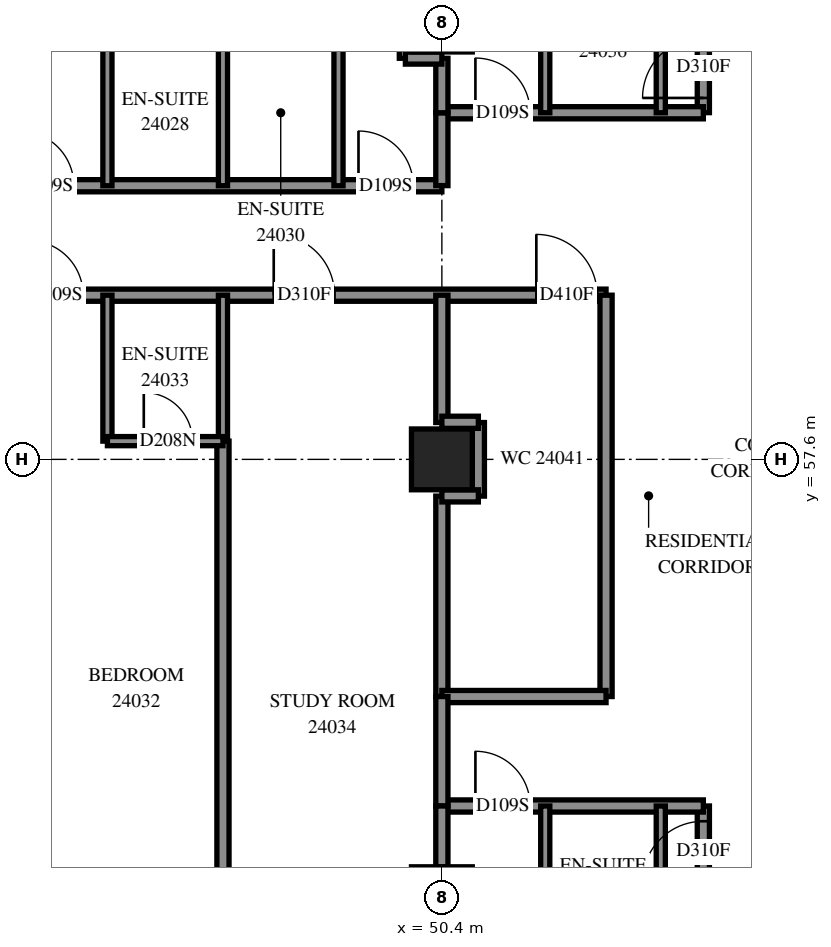
"""IFC4 building model, lengths in metres.
Left out: names, types, materials, properties, quantities, classifications, styles, units other than length and angle.
Written with IfcOpenShell. Run it as: python <this file> out.ifc"""

import sys

from ifc_helpers import new_model, si_unit, direction, frame, frame_2d, origin, origin_2d, place, context, subcontext, project, spatial, rectangle, extrude, element, fill, save


model = new_model("IFC4")
c1 = context("Model", 3, precision=1e-05, world=origin(), true_north=direction((0.0, 1.0)))
c2 = subcontext(c1, "Body", "Model", "MODEL_VIEW")
j1 = project(units=[si_unit("LENGTHUNIT", "METRE"), si_unit("PLANEANGLEUNIT", "RADIAN")], contexts=[c1])
p1 = place(None, origin())
s1 = spatial("IfcSite", under=j1, at=p1, CompositionType="ELEMENT")
p2 = place(p1, origin())
s2 = spatial("IfcBuilding", under=s1, at=p2, CompositionType="ELEMENT")
p3 = place(p2, frame((0.0, 0.0, 91.4)))
s3 = spatial("IfcBuildingStorey", under=s2, at=p3, CompositionType="ELEMENT", Elevation=91.4)
p4 = place(p3, frame((50.4, 57.6, 0.0), z_axis=(0.0, 0.0, 1.0), x_axis=(1.0, 0.0, 0.0)))
e1 = element("IfcColumn", 1, at=p4, inside=s3, PredefinedType="COLUMN", context=c2, shape_type="SweptSolid", body=[
    extrude(rectangle(XDim=1.0, YDim=1.0, at=origin_2d()), origin(), (0.0, 0.0, 1.0), 3.1),
])
p5 = place(p3, frame((28.802, 60.3, 0.0), z_axis=(0.0, 0.0, 1.0), x_axis=(1.0, 0.0, 0.0)))
e2 = element("IfcWall", 2, at=p5, inside=s3, PredefinedType="PARTITIONING", context=c2, shape_type="SweptSolid", body=[
    extrude(rectangle(XDim=24.298, YDim=0.2, at=frame_2d((12.149, 0.0))), origin(), (0.0, 0.0, 1.0), 3.1),
])
p6 = place(p5, frame((5.972, 0.0, 0.0)))
e3 = element("IfcOpeningElement", 3, at=p6, cuts=e2, PredefinedType="OPENING", context=c2, shape_type="SweptSolid", body=[
    extrude(rectangle(XDim=1.0, YDim=2.1, at=frame_2d((0.5, 1.05))), frame((0.0, 0.11, 0.0), z_axis=(0.0, -1.0, 0.0), x_axis=(1.0, 0.0, 0.0)), (0.0, 0.0, 1.0), 0.22),
])
p7 = place(p5, frame((11.323, 0.0, 0.0)))
e4 = element("IfcOpeningElement", 4, at=p7, cuts=e2, PredefinedType="OPENING", context=c2, shape_type="SweptSolid", body=[
    extrude(rectangle(XDim=1.0, YDim=2.1, at=frame_2d((0.5, 1.05))), frame((0.0, 0.11, 0.0), z_axis=(0.0, -1.0, 0.0), x_axis=(1.0, 0.0, 0.0)), (0.0, 0.0, 1.0), 0.22),
])
p8 = place(p5, frame((14.798, 0.0, 0.0)))
e5 = element("IfcOpeningElement", 5, at=p8, cuts=e2, PredefinedType="OPENING", context=c2, shape_type="SweptSolid", body=[
    extrude(rectangle(XDim=0.9, YDim=2.1, at=frame_2d((0.45, 1.05))), frame((0.0, 0.11, 0.0), z_axis=(0.0, -1.0, 0.0), x_axis=(1.0, 0.0, 0.0)), (0.0, 0.0, 1.0), 0.22),
])
p9 = place(p5, frame((18.833, 0.0, 0.0)))
e6 = element("IfcOpeningElement", 6, at=p9, cuts=e2, PredefinedType="OPENING", context=c2, shape_type="SweptSolid", body=[
    extrude(rectangle(XDim=1.0, YDim=2.1, at=frame_2d((0.5, 1.05))), frame((0.0, 0.11, 0.0), z_axis=(0.0, -1.0, 0.0), x_axis=(1.0, 0.0, 0.0)), (0.0, 0.0, 1.0), 0.22),
])
p10 = place(p5, frame((23.151, 0.0, 0.0)))
e7 = element("IfcOpeningElement", 7, at=p10, cuts=e2, PredefinedType="OPENING", context=c2, shape_type="SweptSolid", body=[
    extrude(rectangle(XDim=1.0, YDim=2.1, at=frame_2d((0.5, 1.05))), frame((0.0, 0.11, 0.0), z_axis=(0.0, -1.0, 0.0), x_axis=(1.0, 0.0, 0.0)), (0.0, 0.0, 1.0), 0.22),
])
p11 = place(p3, frame((33.3, 62.1, 0.0), z_axis=(0.0, 0.0, 1.0), x_axis=(1.0, 0.0, 0.0)))
e8 = element("IfcWall", 8, at=p11, inside=s3, PredefinedType="PARTITIONING", context=c2, shape_type="SweptSolid", body=[
    extrude(rectangle(XDim=17.1, YDim=0.2, at=frame_2d((8.55, 0.0))), origin(), (0.0, 0.0, 1.0), 3.1),
])
p12 = place(p11, frame((6.258, 0.0, 0.0)))
e9 = element("IfcOpeningElement", 9, at=p12, cuts=e8, PredefinedType="OPENING", context=c2, shape_type="SweptSolid", body=[
    extrude(rectangle(XDim=1.0, YDim=2.1, at=frame_2d((0.5, 1.05))), frame((0.0, 0.11, 0.0), z_axis=(0.0, -1.0, 0.0), x_axis=(1.0, 0.0, 0.0)), (0.0, 0.0, 1.0), 0.22),
])
p13 = place(p11, frame((10.148, 0.0, 0.0)))
e10 = element("IfcOpeningElement", 10, at=p13, cuts=e8, PredefinedType="OPENING", context=c2, shape_type="SweptSolid", body=[
    extrude(rectangle(XDim=0.9, YDim=2.1, at=frame_2d((0.45, 1.05))), frame((0.0, 0.11, 0.0), z_axis=(0.0, -1.0, 0.0), x_axis=(1.0, 0.0, 0.0)), (0.0, 0.0, 1.0), 0.22),
])
p14 = place(p11, frame((15.729, 0.0, 0.0)))
e11 = element("IfcOpeningElement", 11, at=p14, cuts=e8, PredefinedType="OPENING", context=c2, shape_type="SweptSolid", body=[
    extrude(rectangle(XDim=0.9, YDim=2.1, at=frame_2d((0.45, 1.05))), frame((0.0, 0.11, 0.0), z_axis=(0.0, -1.0, 0.0), x_axis=(1.0, 0.0, 0.0)), (0.0, 0.0, 1.0), 0.22),
])
p15 = place(p3, frame((46.8, 49.75, 0.0), z_axis=(0.0, 0.0, 1.0), x_axis=(0.0, 1.0, 0.0)))
e12 = element("IfcWall", 12, at=p15, inside=s3, PredefinedType="PARTITIONING", context=c2, shape_type="SweptSolid", body=[
    extrude(rectangle(XDim=8.15, YDim=0.2, at=frame_2d((4.075, 0.0))), origin(), (0.0, 0.0, 1.0), 3.1),
])
p16 = place(p3, frame((53.1, 53.7, 0.0), z_axis=(0.0, 0.0, 1.0), x_axis=(0.0, 1.0, 0.0)))
e13 = element("IfcWall", 13, at=p16, inside=s3, PredefinedType="PARTITIONING", context=c2, shape_type="SweptSolid", body=[
    extrude(rectangle(XDim=6.6, YDim=0.2, at=frame_2d((3.3, 0.0))), origin(), (0.0, 0.0, 1.0), 3.1),
])
p17 = place(p3, frame((54.7, 47.5, 0.0), z_axis=(0.0, 0.0, 1.0), x_axis=(0.0, 1.0, 0.0)))
e14 = element("IfcWall", 14, at=p17, inside=s3, PredefinedType="PARTITIONING", context=c2, shape_type="SweptSolid", body=[
    extrude(rectangle(XDim=4.4, YDim=0.2, at=frame_2d((2.2, 0.0))), origin(), (0.0, 0.0, 1.0), 3.1),
])
p18 = place(p17, frame((3.149, 0.0, 0.0)))
e15 = element("IfcOpeningElement", 15, at=p18, cuts=e14, PredefinedType="OPENING", context=c2, shape_type="SweptSolid", body=[
    extrude(rectangle(XDim=1.0, YDim=2.1, at=frame_2d((0.5, 1.05))), frame((0.0, 0.11, 0.0), z_axis=(0.0, -1.0, 0.0), x_axis=(1.0, 0.0, 0.0)), (0.0, 0.0, 1.0), 0.22),
])
p19 = place(p3, frame((54.7, 63.302, 0.0), z_axis=(0.0, 0.0, 1.0), x_axis=(0.0, 1.0, 0.0)))
e16 = element("IfcWall", 16, at=p19, inside=s3, PredefinedType="PARTITIONING", context=c2, shape_type="SweptSolid", body=[
    extrude(rectangle(XDim=4.398, YDim=0.2, at=frame_2d((2.199, 0.0))), origin(), (0.0, 0.0, 1.0), 3.1),
])
p20 = place(p19, frame((0.242, 0.0, 0.0)))
e17 = element("IfcOpeningElement", 17, at=p20, cuts=e16, PredefinedType="OPENING", context=c2, shape_type="SweptSolid", body=[
    extrude(rectangle(XDim=1.0, YDim=2.1, at=frame_2d((0.5, 1.05))), frame((0.0, 0.11, 0.0), z_axis=(0.0, -1.0, 0.0), x_axis=(1.0, 0.0, 0.0)), (0.0, 0.0, 1.0), 0.22),
])
p21 = place(p3, frame((50.4, 51.9, 0.0), z_axis=(0.0, 0.0, 1.0), x_axis=(1.0, 0.0, 0.0)))
e18 = element("IfcWall", 18, at=p21, inside=s3, PredefinedType="PARTITIONING", context=c2, shape_type="SweptSolid", body=[
    extrude(rectangle(XDim=4.3, YDim=0.2, at=frame_2d((2.15, 0.0))), origin(), (0.0, 0.0, 1.0), 3.1),
])
p22 = place(p21, frame((0.552, 0.0, 0.0)))
e19 = element("IfcOpeningElement", 19, at=p22, cuts=e18, PredefinedType="OPENING", context=c2, shape_type="SweptSolid", body=[
    extrude(rectangle(XDim=0.9, YDim=2.1, at=frame_2d((0.45, 1.05))), frame((0.0, 0.11, 0.0), z_axis=(0.0, -1.0, 0.0), x_axis=(1.0, 0.0, 0.0)), (0.0, 0.0, 1.0), 0.22),
])
p23 = place(p3, frame((50.4, 63.3, 0.0), z_axis=(0.0, 0.0, 1.0), x_axis=(1.0, 0.0, 0.0)))
e20 = element("IfcWall", 20, at=p23, inside=s3, PredefinedType="PARTITIONING", context=c2, shape_type="SweptSolid", body=[
    extrude(rectangle(XDim=4.3, YDim=0.2, at=frame_2d((2.15, 0.0))), origin(), (0.0, 0.0, 1.0), 3.1),
])
p24 = place(p23, frame((0.552, 0.0, 0.0)))
e21 = element("IfcOpeningElement", 21, at=p24, cuts=e20, PredefinedType="OPENING", context=c2, shape_type="SweptSolid", body=[
    extrude(rectangle(XDim=0.9, YDim=2.1, at=frame_2d((0.45, 1.05))), frame((0.0, 0.11, 0.0), z_axis=(0.0, -1.0, 0.0), x_axis=(1.0, 0.0, 0.0)), (0.0, 0.0, 1.0), 0.22),
])
p25 = place(p3, frame((50.4, 53.7, 0.0), z_axis=(0.0, 0.0, 1.0), x_axis=(0.0, 1.0, 0.0)))
e22 = element("IfcWall", 22, at=p25, inside=s3, PredefinedType="PARTITIONING", context=c2, shape_type="SweptSolid", body=[
    extrude(rectangle(XDim=3.296, YDim=0.2, at=frame_2d((1.648, 0.0))), origin(), (0.0, 0.0, 1.0), 3.1),
])
p26 = place(p3, frame((50.4, 53.7, 0.0), z_axis=(0.0, 0.0, 1.0), x_axis=(1.0, 0.0, 0.0)))
e23 = element("IfcWall", 23, at=p26, inside=s3, PredefinedType="PARTITIONING", context=c2, shape_type="SweptSolid", body=[
    extrude(rectangle(XDim=2.7, YDim=0.2, at=frame_2d((1.35, 0.0))), origin(), (0.0, 0.0, 1.0), 3.1),
])
for number, where, z_axis, x_axis in (
    (24, (52.1, 63.3, 0.0), (0.0, 0.0, 1.0), (0.0, 1.0, 0.0)),
    (25, (54.0, 63.3, 0.0), (0.0, 0.0, 1.0), (0.0, 1.0, 0.0)),
    (26, (44.9, 57.9, 0.0), (0.0, 0.0, 1.0), (0.0, 1.0, 0.0)),
    (27, (44.9, 62.1, 0.0), (0.0, 0.0, 1.0), (0.0, 1.0, 0.0)),
    (28, (46.8, 57.9, 0.0), (0.0, 0.0, 1.0), (0.0, 1.0, 0.0)),
    (29, (46.8, 62.1, 0.0), (0.0, 0.0, 1.0), (0.0, 1.0, 0.0)),
    (30, (48.7, 62.1, 0.0), (0.0, 0.0, 1.0), (0.0, 1.0, 0.0)),
    (31, (52.1, 49.5, 0.0), (0.0, 0.0, 1.0), (0.0, 1.0, 0.0)),
    (32, (54.0, 49.5, 0.0), (0.0, 0.0, 1.0), (0.0, 1.0, 0.0)),
):
    element("IfcWall", number, at=place(p3, frame(where, z_axis=z_axis, x_axis=x_axis)), inside=s3, PredefinedType="PARTITIONING", context=c2, shape_type="SweptSolid", body=[
        extrude(rectangle(XDim=2.4, YDim=0.15, at=frame_2d((1.2, 0.0))), origin(), (0.0, 0.0, 1.0), 3.1),
    ])
p27 = place(p3, frame((50.4, 58.206, 0.0), z_axis=(0.0, 0.0, 1.0), x_axis=(0.0, 1.0, 0.0)))
e33 = element("IfcWall", 33, at=p27, inside=s3, PredefinedType="PARTITIONING", context=c2, shape_type="SweptSolid", body=[
    extrude(rectangle(XDim=2.094, YDim=0.2, at=frame_2d((1.047, 0.0))), origin(), (0.0, 0.0, 1.0), 3.1),
])
p28 = place(p3, frame((44.9, 57.9, 0.0), z_axis=(0.0, 0.0, 1.0), x_axis=(1.0, 0.0, 0.0)))
e34 = element("IfcWall", 34, at=p28, inside=s3, PredefinedType="PARTITIONING", context=c2, shape_type="SweptSolid", body=[
    extrude(rectangle(XDim=1.9, YDim=0.15, at=frame_2d((0.95, 0.0))), origin(), (0.0, 0.0, 1.0), 3.1),
])
p29 = place(p28, frame((0.598, 0.0, 0.0)))
e35 = element("IfcOpeningElement", 35, at=p29, cuts=e34, PredefinedType="OPENING", context=c2, shape_type="SweptSolid", body=[
    extrude(rectangle(XDim=0.8, YDim=2.1, at=frame_2d((0.4, 1.05))), frame((0.0, 0.085, 0.0), z_axis=(0.0, -1.0, 0.0), x_axis=(1.0, 0.0, 0.0)), (0.0, 0.0, 1.0), 0.17),
])
p30 = place(p3, frame((50.4, 51.9, 0.0), z_axis=(0.0, 0.0, 1.0), x_axis=(0.0, 1.0, 0.0)))
e36 = element("IfcWall", 36, at=p30, inside=s3, PredefinedType="PARTITIONING", context=c2, shape_type="SweptSolid", body=[
    extrude(rectangle(XDim=1.8, YDim=0.2, at=frame_2d((0.9, 0.0))), origin(), (0.0, 0.0, 1.0), 3.1),
])
p31 = place(p3, frame((51.0, 56.996, 0.0), z_axis=(0.0, 0.0, 1.0), x_axis=(0.0, 1.0, 0.0)))
e37 = element("IfcWall", 37, at=p31, inside=s3, PredefinedType="PARTITIONING", context=c2, shape_type="SweptSolid", body=[
    extrude(rectangle(XDim=1.21, YDim=0.2, at=frame_2d((0.605, 0.0))), origin(), (0.0, 0.0, 1.0), 3.1),
])
p32 = place(p3, frame((49.8, 64.196, 0.0), z_axis=(0.0, 0.0, 1.0), x_axis=(0.0, 1.0, 0.0)))
e38 = element("IfcWall", 38, at=p32, inside=s3, PredefinedType="PARTITIONING", context=c2, shape_type="SweptSolid", body=[
    extrude(rectangle(XDim=1.208, YDim=0.2, at=frame_2d((0.604, 0.0))), origin(), (0.0, 0.0, 1.0), 3.1),
])
p33 = place(p3, frame((50.4, 62.102, 0.0), z_axis=(0.0, 0.0, 1.0), x_axis=(0.0, 1.0, 0.0)))
e39 = element("IfcWall", 39, at=p33, inside=s3, PredefinedType="PARTITIONING", context=c2, shape_type="SweptSolid", body=[
    extrude(rectangle(XDim=1.198, YDim=0.2, at=frame_2d((0.599, 0.0))), origin(), (0.0, 0.0, 1.0), 3.1),
])
p34 = place(p3, frame((50.4, 50.9, 0.0), z_axis=(0.0, 0.0, 1.0), x_axis=(0.0, 1.0, 0.0)))
e40 = element("IfcWall", 40, at=p34, inside=s3, PredefinedType="PARTITIONING", context=c2, shape_type="SweptSolid", body=[
    extrude(rectangle(XDim=1.0, YDim=0.2, at=frame_2d((0.5, 0.0))), origin(), (0.0, 0.0, 1.0), 3.1),
])
p35 = place(p3, frame((50.4, 63.3, 0.0), z_axis=(0.0, 0.0, 1.0), x_axis=(0.0, 1.0, 0.0)))
e41 = element("IfcWall", 41, at=p35, inside=s3, PredefinedType="PARTITIONING", context=c2, shape_type="SweptSolid", body=[
    extrude(rectangle(XDim=0.896, YDim=0.2, at=frame_2d((0.448, 0.0))), origin(), (0.0, 0.0, 1.0), 3.1),
])
for number, where, z_axis, x_axis in (
    (42, (49.8, 64.2, 0.0), (0.0, 0.0, 1.0), (1.0, 0.0, 0.0)),
    (43, (50.4, 58.21, 0.0), (0.0, 0.0, 1.0), (1.0, 0.0, 0.0)),
    (44, (50.4, 57.0, 0.0), (0.0, 0.0, 1.0), (1.0, 0.0, 0.0)),
):
    element("IfcWall", number, at=place(p3, frame(where, z_axis=z_axis, x_axis=x_axis)), inside=s3, PredefinedType="PARTITIONING", context=c2, shape_type="SweptSolid", body=[
        extrude(rectangle(XDim=0.6, YDim=0.2, at=frame_2d((0.3, 0.0))), origin(), (0.0, 0.0, 1.0), 3.1),
    ])
p36 = place(p13, origin())
e45 = element("IfcDoor", 45, at=p36, inside=s3, OperationType="SINGLE_SWING_RIGHT", PredefinedType="DOOR", context=c2, shape_type="SweptSolid", body=[
    extrude(rectangle(XDim=0.9, YDim=2.1, at=frame_2d((0.45, 1.05))), frame((0.0, 0.025, 0.0), z_axis=(0.0, -1.0, 0.0), x_axis=(1.0, 0.0, 0.0)), (0.0, 0.0, 1.0), 0.05),
])
fill(e10, e45)
p37 = place(p14, origin())
e46 = element("IfcDoor", 46, at=p37, inside=s3, OperationType="SINGLE_SWING_LEFT", PredefinedType="DOOR", context=c2, shape_type="SweptSolid", body=[
    extrude(rectangle(XDim=0.9, YDim=2.1, at=frame_2d((0.45, 1.05))), frame((0.0, 0.025, 0.0), z_axis=(0.0, -1.0, 0.0), x_axis=(1.0, 0.0, 0.0)), (0.0, 0.0, 1.0), 0.05),
])
fill(e11, e46)
p38 = place(p8, origin())
e47 = element("IfcDoor", 47, at=p38, inside=s3, OperationType="SINGLE_SWING_LEFT", PredefinedType="DOOR", context=c2, shape_type="SweptSolid", body=[
    extrude(rectangle(XDim=0.9, YDim=2.1, at=frame_2d((0.45, 1.05))), frame((0.0, 0.025, 0.0), z_axis=(0.0, -1.0, 0.0), x_axis=(1.0, 0.0, 0.0)), (0.0, 0.0, 1.0), 0.05),
])
fill(e5, e47)
p39 = place(p29, origin())
e48 = element("IfcDoor", 48, at=p39, inside=s3, OperationType="SINGLE_SWING_RIGHT", PredefinedType="DOOR", context=c2, shape_type="SweptSolid", body=[
    extrude(rectangle(XDim=0.8, YDim=2.1, at=frame_2d((0.4, 1.05))), frame((0.0, 0.025, 0.0), z_axis=(0.0, -1.0, 0.0), x_axis=(1.0, 0.0, 0.0)), (0.0, 0.0, 1.0), 0.05),
])
fill(e35, e48)
p40 = place(p9, origin())
e49 = element("IfcDoor", 49, at=p40, inside=s3, OperationType="SINGLE_SWING_RIGHT", PredefinedType="DOOR", context=c2, shape_type="SweptSolid", body=[
    extrude(rectangle(XDim=1.0, YDim=2.1, at=frame_2d((0.5, 1.05))), frame((0.0, 0.025, 0.0), z_axis=(0.0, -1.0, 0.0), x_axis=(1.0, 0.0, 0.0)), (0.0, 0.0, 1.0), 0.05),
])
fill(e6, e49)
p41 = place(p24, origin())
e50 = element("IfcDoor", 50, at=p41, inside=s3, OperationType="SINGLE_SWING_RIGHT", PredefinedType="DOOR", context=c2, shape_type="SweptSolid", body=[
    extrude(rectangle(XDim=0.9, YDim=2.1, at=frame_2d((0.45, 1.05))), frame((0.0, 0.025, 0.0), z_axis=(0.0, -1.0, 0.0), x_axis=(1.0, 0.0, 0.0)), (0.0, 0.0, 1.0), 0.05),
])
fill(e21, e50)
p42 = place(p20, origin())
e51 = element("IfcDoor", 51, at=p42, inside=s3, OperationType="SINGLE_SWING_LEFT", PredefinedType="DOOR", context=c2, shape_type="SweptSolid", body=[
    extrude(rectangle(XDim=1.0, YDim=2.1, at=frame_2d((0.5, 1.05))), frame((0.0, 0.025, 0.0), z_axis=(0.0, -1.0, 0.0), x_axis=(1.0, 0.0, 0.0)), (0.0, 0.0, 1.0), 0.05),
])
fill(e17, e51)
p43 = place(p10, origin())
e52 = element("IfcDoor", 52, at=p43, inside=s3, OperationType="SINGLE_SWING_LEFT", PredefinedType="DOOR", context=c2, shape_type="SweptSolid", body=[
    extrude(rectangle(XDim=1.0, YDim=2.1, at=frame_2d((0.5, 1.05))), frame((0.0, 0.025, 0.0), z_axis=(0.0, -1.0, 0.0), x_axis=(1.0, 0.0, 0.0)), (0.0, 0.0, 1.0), 0.05),
])
fill(e7, e52)
p44 = place(p22, origin())
e53 = element("IfcDoor", 53, at=p44, inside=s3, OperationType="SINGLE_SWING_LEFT", PredefinedType="DOOR", context=c2, shape_type="SweptSolid", body=[
    extrude(rectangle(XDim=0.9, YDim=2.1, at=frame_2d((0.45, 1.05))), frame((0.0, 0.025, 0.0), z_axis=(0.0, -1.0, 0.0), x_axis=(1.0, 0.0, 0.0)), (0.0, 0.0, 1.0), 0.05),
])
fill(e19, e53)
p45 = place(p18, origin())
e54 = element("IfcDoor", 54, at=p45, inside=s3, OperationType="SINGLE_SWING_RIGHT", PredefinedType="DOOR", context=c2, shape_type="SweptSolid", body=[
    extrude(rectangle(XDim=1.0, YDim=2.1, at=frame_2d((0.5, 1.05))), frame((0.0, 0.025, 0.0), z_axis=(0.0, -1.0, 0.0), x_axis=(1.0, 0.0, 0.0)), (0.0, 0.0, 1.0), 0.05),
])
fill(e15, e54)
save(model, sys.argv[1])
